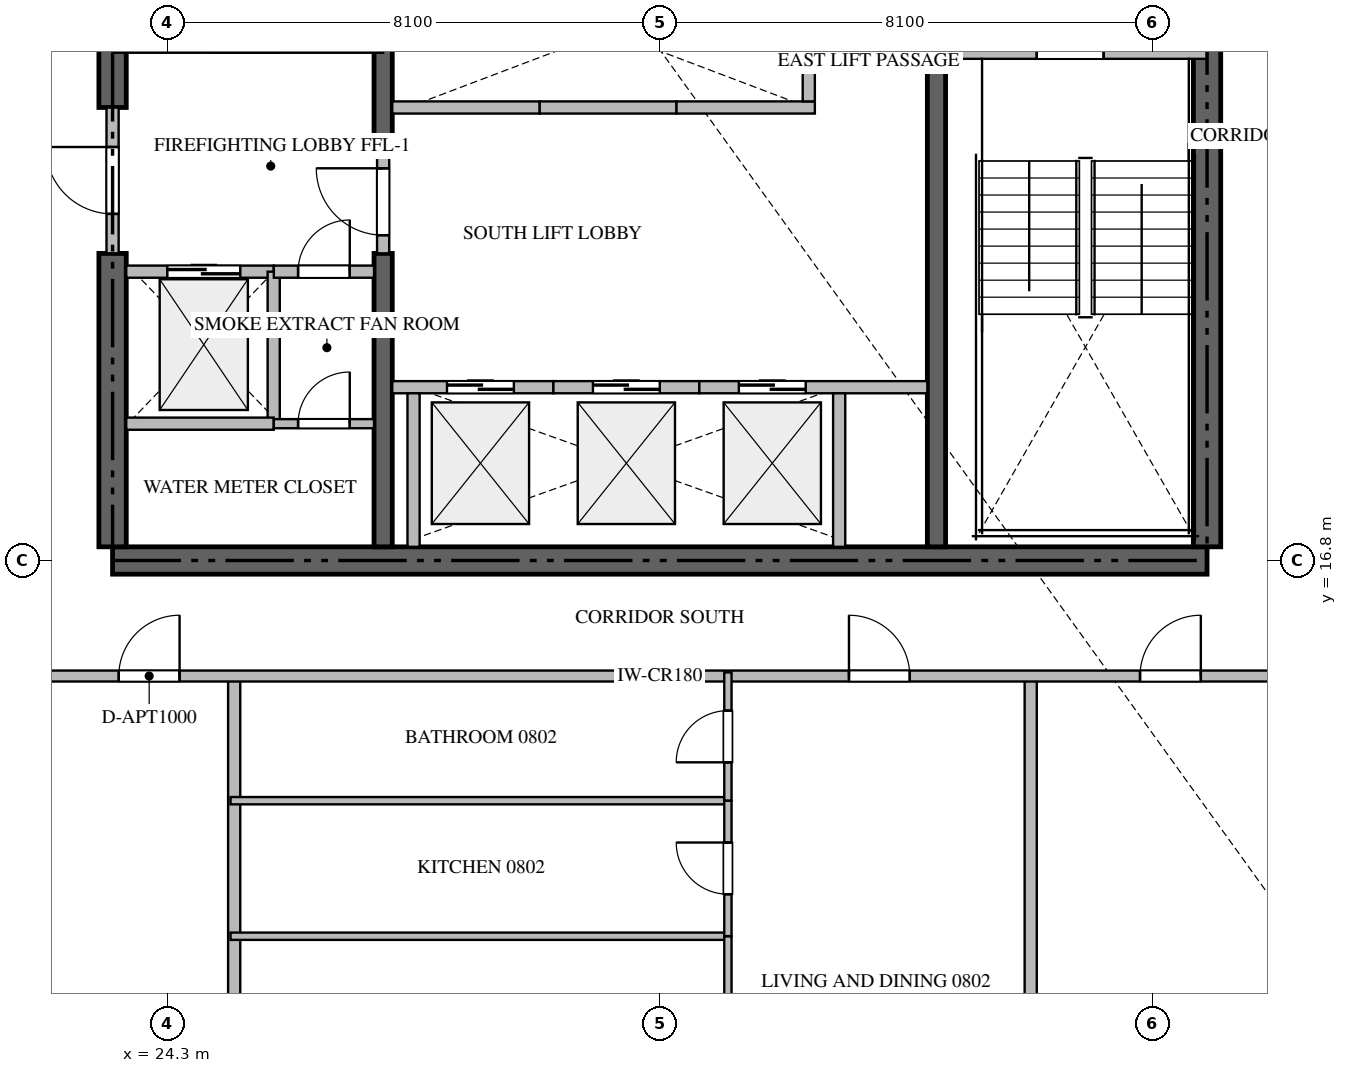
"""IFC4 building model, lengths in metres.
Left out: names, types, materials, properties, quantities, classifications, styles, units other than length and angle.
Written with IfcOpenShell. Run it as: python <this file> out.ifc"""

import sys

from ifc_helpers import new_model, si_unit, direction, frame, frame_2d, origin, place, context, subcontext, project, spatial, rectangle, extrude, source, transform, mapped, element, fill, save


model = new_model("IFC4")
c1 = context("Model", 3, precision=1e-05, world=origin(), true_north=direction((0.0, 1.0)))
c2 = subcontext(c1, "Body", "Model", "MODEL_VIEW")
j1 = project(units=[si_unit("LENGTHUNIT", "METRE"), si_unit("PLANEANGLEUNIT", "RADIAN")], contexts=[c1])
p1 = place(None, origin())
s1 = spatial("IfcSite", under=j1, at=p1, CompositionType="ELEMENT")
p2 = place(p1, origin())
s2 = spatial("IfcBuilding", under=s1, at=p2, CompositionType="ELEMENT")
p3 = place(p2, frame((0.0, 0.0, 37.95)))
s3 = spatial("IfcBuildingStorey", under=s2, at=p3, CompositionType="ELEMENT", Elevation=37.95)
p4 = place(p3, frame((23.4, 16.8, -0.26), z_axis=(0.0, 0.0, 1.0), x_axis=(1.0, 0.0, 0.0)))
e1 = element("IfcWall", 1, at=p4, inside=s3, PredefinedType="SHEAR", context=c2, shape_type="SweptSolid", body=[
    extrude(rectangle(XDim=18.0, YDim=0.45, at=frame_2d((9.0, 0.0))), origin(), (0.0, 0.0, 1.0), 3.748),
])
p5 = place(p3, frame((23.4, 17.025, -0.26), z_axis=(0.0, 0.0, 1.0), x_axis=(0.0, 1.0, 0.0)))
e2 = element("IfcWall", 2, at=p5, inside=s3, PredefinedType="SHEAR", context=c2, shape_type="SweptSolid", body=[
    extrude(rectangle(XDim=4.825, YDim=0.45, at=frame_2d((2.413, 0.0))), origin(), (0.0, 0.0, 1.0), 3.748),
])
p6 = place(p3, frame((23.4, 24.25, -0.26), z_axis=(0.0, 0.0, 1.0), x_axis=(0.0, 1.0, 0.0)))
e3 = element("IfcWall", 3, at=p6, inside=s3, PredefinedType="SHEAR", context=c2, shape_type="SweptSolid", body=[
    extrude(rectangle(XDim=9.125, YDim=0.45, at=frame_2d((4.562, 0.0))), origin(), (0.0, 0.0, 1.0), 3.748),
])
p7 = place(p3, frame((41.4, 17.025, -0.26), z_axis=(0.0, 0.0, 1.0), x_axis=(0.0, 1.0, 0.0)))
e4 = element("IfcWall", 4, at=p7, inside=s3, PredefinedType="SHEAR", context=c2, shape_type="SweptSolid", body=[
    extrude(rectangle(XDim=8.325, YDim=0.45, at=frame_2d((4.163, 0.0))), origin(), (0.0, 0.0, 1.0), 3.748),
])
p8 = place(p3, frame((27.85, 17.025, -0.26), z_axis=(0.0, 0.0, 1.0), x_axis=(0.0, 1.0, 0.0)))
e5 = element("IfcWall", 5, at=p8, inside=s3, PredefinedType="SHEAR", context=c2, shape_type="SweptSolid", body=[
    extrude(rectangle(XDim=4.825, YDim=0.3, at=frame_2d((2.413, 0.0))), origin(), (0.0, 0.0, 1.0), 3.748),
])
p9 = place(p3, frame((27.85, 23.55, -0.26), z_axis=(0.0, 0.0, 1.0), x_axis=(0.0, 1.0, 0.0)))
e6 = element("IfcWall", 6, at=p9, inside=s3, PredefinedType="SHEAR", context=c2, shape_type="SweptSolid", body=[
    extrude(rectangle(XDim=9.825, YDim=0.3, at=frame_2d((4.913, 0.0))), origin(), (0.0, 0.0, 1.0), 3.748),
])
p10 = place(p3, frame((36.95, 17.025, -0.26), z_axis=(0.0, 0.0, 1.0), x_axis=(0.0, 1.0, 0.0)))
e7 = element("IfcWall", 7, at=p10, inside=s3, PredefinedType="SHEAR", context=c2, shape_type="SweptSolid", body=[
    extrude(rectangle(XDim=8.325, YDim=0.3, at=frame_2d((4.163, 0.0))), origin(), (0.0, 0.0, 1.0), 3.748),
])
p11 = place(p3, frame((36.95, 25.15, 0.0), z_axis=(0.0, 0.0, 1.0), x_axis=(1.0, 0.0, 0.0)))
e8 = element("IfcWall", 8, at=p11, inside=s3, PredefinedType="STANDARD", context=c2, shape_type="SweptSolid", body=[
    extrude(rectangle(XDim=4.45, YDim=0.2, at=frame_2d((2.225, 0.0))), origin(), (0.0, 0.0, 1.0), 3.49),
])
p12 = place(p11, frame((1.65, 0.0, 0.0)))
e9 = element("IfcOpeningElement", 9, at=p12, cuts=e8, PredefinedType="OPENING", context=c2, shape_type="SweptSolid", body=[
    extrude(rectangle(XDim=1.1, YDim=2.15, at=frame_2d((0.55, 1.075))), frame((0.0, 0.11, 0.0), z_axis=(0.0, -1.0, 0.0), x_axis=(1.0, 0.0, 0.0)), (0.0, 0.0, 1.0), 0.22),
])
p13 = place(p3, frame((23.625, 21.55, 0.0), z_axis=(0.0, 0.0, 1.0), x_axis=(1.0, 0.0, 0.0)))
e10 = element("IfcWall", 10, at=p13, inside=s3, PredefinedType="STANDARD", context=c2, shape_type="SweptSolid", body=[
    extrude(rectangle(XDim=2.425, YDim=0.2, at=frame_2d((1.212, 0.0))), origin(), (0.0, 0.0, 1.0), 3.49),
])
p14 = place(p13, frame((0.675, 0.0, 0.0)))
e11 = element("IfcOpeningElement", 11, at=p14, cuts=e10, PredefinedType="OPENING", context=c2, shape_type="SweptSolid", body=[
    extrude(rectangle(XDim=1.2, YDim=2.2, at=frame_2d((0.6, 1.1))), frame((0.0, 0.11, 0.0), z_axis=(0.0, -1.0, 0.0), x_axis=(1.0, 0.0, 0.0)), (0.0, 0.0, 1.0), 0.22),
])
p15 = place(p3, frame((28.0, 19.65, 0.0), z_axis=(0.0, 0.0, 1.0), x_axis=(1.0, 0.0, 0.0)))
e12 = element("IfcWall", 12, at=p15, inside=s3, PredefinedType="STANDARD", context=c2, shape_type="SweptSolid", body=[
    extrude(rectangle(XDim=2.65, YDim=0.2, at=frame_2d((1.325, 0.0))), origin(), (0.0, 0.0, 1.0), 3.49),
])
p16 = place(p15, frame((0.9, 0.0, 0.0)))
e13 = element("IfcOpeningElement", 13, at=p16, cuts=e12, PredefinedType="OPENING", context=c2, shape_type="SweptSolid", body=[
    extrude(rectangle(XDim=1.1, YDim=2.2, at=frame_2d((0.55, 1.1))), frame((0.0, 0.11, 0.0), z_axis=(0.0, -1.0, 0.0), x_axis=(1.0, 0.0, 0.0)), (0.0, 0.0, 1.0), 0.22),
])
p17 = place(p3, frame((28.35, 17.025, 0.0), z_axis=(0.0, 0.0, 1.0), x_axis=(0.0, 1.0, 0.0)))
e14 = element("IfcWall", 14, at=p17, inside=s3, PredefinedType="STANDARD", context=c2, shape_type="SweptSolid", body=[
    extrude(rectangle(XDim=2.525, YDim=0.2, at=frame_2d((1.263, 0.0))), origin(), (0.0, 0.0, 1.0), 3.49),
])
p18 = place(p3, frame((30.65, 19.65, 0.0), z_axis=(0.0, 0.0, 1.0), x_axis=(1.0, 0.0, 0.0)))
e15 = element("IfcWall", 15, at=p18, inside=s3, PredefinedType="STANDARD", context=c2, shape_type="SweptSolid", body=[
    extrude(rectangle(XDim=2.4, YDim=0.2, at=frame_2d((1.2, 0.0))), origin(), (0.0, 0.0, 1.0), 3.49),
])
p19 = place(p18, frame((0.65, 0.0, 0.0)))
e16 = element("IfcOpeningElement", 16, at=p19, cuts=e15, PredefinedType="OPENING", context=c2, shape_type="SweptSolid", body=[
    extrude(rectangle(XDim=1.1, YDim=2.2, at=frame_2d((0.55, 1.1))), frame((0.0, 0.11, 0.0), z_axis=(0.0, -1.0, 0.0), x_axis=(1.0, 0.0, 0.0)), (0.0, 0.0, 1.0), 0.22),
])
p20 = place(p3, frame((33.05, 19.65, 0.0), z_axis=(0.0, 0.0, 1.0), x_axis=(1.0, 0.0, 0.0)))
e17 = element("IfcWall", 17, at=p20, inside=s3, PredefinedType="STANDARD", context=c2, shape_type="SweptSolid", body=[
    extrude(rectangle(XDim=3.75, YDim=0.2, at=frame_2d((1.875, 0.0))), origin(), (0.0, 0.0, 1.0), 3.49),
])
p21 = place(p20, frame((0.65, 0.0, 0.0)))
e18 = element("IfcOpeningElement", 18, at=p21, cuts=e17, PredefinedType="OPENING", context=c2, shape_type="SweptSolid", body=[
    extrude(rectangle(XDim=1.1, YDim=2.2, at=frame_2d((0.55, 1.1))), frame((0.0, 0.11, 0.0), z_axis=(0.0, -1.0, 0.0), x_axis=(1.0, 0.0, 0.0)), (0.0, 0.0, 1.0), 0.22),
])
p22 = place(p3, frame((35.35, 17.025, 0.0), z_axis=(0.0, 0.0, 1.0), x_axis=(0.0, 1.0, 0.0)))
e19 = element("IfcWall", 19, at=p22, inside=s3, PredefinedType="STANDARD", context=c2, shape_type="SweptSolid", body=[
    extrude(rectangle(XDim=2.525, YDim=0.2, at=frame_2d((1.263, 0.0))), origin(), (0.0, 0.0, 1.0), 3.49),
])
p23 = place(p3, frame((28.0, 24.25, 0.0), z_axis=(0.0, 0.0, 1.0), x_axis=(1.0, 0.0, 0.0)))
e20 = element("IfcWall", 20, at=p23, inside=s3, PredefinedType="STANDARD", context=c2, shape_type="SweptSolid", body=[
    extrude(rectangle(XDim=2.425, YDim=0.2, at=frame_2d((1.212, 0.0))), origin(), (0.0, 0.0, 1.0), 3.49),
])
p24 = place(p3, frame((30.425, 24.25, 0.0), z_axis=(0.0, 0.0, 1.0), x_axis=(1.0, 0.0, 0.0)))
e21 = element("IfcWall", 21, at=p24, inside=s3, PredefinedType="STANDARD", context=c2, shape_type="SweptSolid", body=[
    extrude(rectangle(XDim=2.25, YDim=0.2, at=frame_2d((1.125, 0.0))), origin(), (0.0, 0.0, 1.0), 3.49),
])
p25 = place(p3, frame((32.675, 24.25, 0.0), z_axis=(0.0, 0.0, 1.0), x_axis=(1.0, 0.0, 0.0)))
e22 = element("IfcWall", 22, at=p25, inside=s3, PredefinedType="STANDARD", context=c2, shape_type="SweptSolid", body=[
    extrude(rectangle(XDim=2.275, YDim=0.2, at=frame_2d((1.137, 0.0))), origin(), (0.0, 0.0, 1.0), 3.49),
])
for number, where, z_axis, x_axis in (
    (23, (34.85, 24.35, 0.0), (0.0, 0.0, 1.0), (0.0, 1.0, 0.0)),
    (24, (26.05, 19.05, 0.0), (0.0, 0.0, 1.0), (0.0, 1.0, 0.0)),
):
    element("IfcWall", number, at=place(p3, frame(where, z_axis=z_axis, x_axis=x_axis)), inside=s3, PredefinedType="STANDARD", context=c2, shape_type="SweptSolid", body=[
        extrude(rectangle(XDim=2.5, YDim=0.2, at=frame_2d((1.25, 0.0))), origin(), (0.0, 0.0, 1.0), 3.49),
    ])
p26 = place(p3, frame((23.625, 19.05, 0.0), z_axis=(0.0, 0.0, 1.0), x_axis=(1.0, 0.0, 0.0)))
e25 = element("IfcWall", 25, at=p26, inside=s3, PredefinedType="STANDARD", context=c2, shape_type="SweptSolid", body=[
    extrude(rectangle(XDim=2.425, YDim=0.2, at=frame_2d((1.212, 0.0))), origin(), (0.0, 0.0, 1.0), 3.49),
])
p27 = place(p3, frame((26.052, 21.55, 0.0), z_axis=(0.0, 0.0, 1.0), x_axis=(1.0, 0.0, 0.0)))
e26 = element("IfcWall", 26, at=p27, inside=s3, PredefinedType="STANDARD", context=c2, shape_type="SweptSolid", body=[
    extrude(rectangle(XDim=1.648, YDim=0.2, at=frame_2d((0.824, 0.0))), origin(), (0.0, 0.0, 1.0), 3.49),
])
p28 = place(p27, frame((0.399, 0.0, 0.0)))
e27 = element("IfcOpeningElement", 27, at=p28, cuts=e26, PredefinedType="OPENING", context=c2, shape_type="SweptSolid", body=[
    extrude(rectangle(XDim=0.85, YDim=2.1, at=frame_2d((0.425, 1.05))), frame((0.0, 0.11, 0.0), z_axis=(0.0, -1.0, 0.0), x_axis=(1.0, 0.0, 0.0)), (0.0, 0.0, 1.0), 0.22),
])
p29 = place(p3, frame((23.4, 21.852, 0.0), z_axis=(0.0, 0.0, 1.0), x_axis=(0.0, 1.0, 0.0)))
e28 = element("IfcWall", 28, at=p29, inside=s3, PredefinedType="STANDARD", context=c2, shape_type="SweptSolid", body=[
    extrude(rectangle(XDim=2.396, YDim=0.2, at=frame_2d((1.198, 0.0))), origin(), (0.0, 0.0, 1.0), 3.49),
])
p30 = place(p29, frame((0.648, 0.0, 0.0)))
e29 = element("IfcOpeningElement", 29, at=p30, cuts=e28, PredefinedType="OPENING", context=c2, shape_type="SweptSolid", body=[
    extrude(rectangle(XDim=1.1, YDim=2.15, at=frame_2d((0.55, 1.075))), frame((0.0, 0.11, 0.0), z_axis=(0.0, -1.0, 0.0), x_axis=(1.0, 0.0, 0.0)), (0.0, 0.0, 1.0), 0.22),
])
p31 = place(p3, frame((27.85, 21.852, 0.0), z_axis=(0.0, 0.0, 1.0), x_axis=(0.0, 1.0, 0.0)))
e30 = element("IfcWall", 30, at=p31, inside=s3, PredefinedType="STANDARD", context=c2, shape_type="SweptSolid", body=[
    extrude(rectangle(XDim=1.696, YDim=0.2, at=frame_2d((0.848, 0.0))), origin(), (0.0, 0.0, 1.0), 3.49),
])
p32 = place(p31, frame((0.298, 0.0, 0.0)))
e31 = element("IfcOpeningElement", 31, at=p32, cuts=e30, PredefinedType="OPENING", context=c2, shape_type="SweptSolid", body=[
    extrude(rectangle(XDim=1.1, YDim=2.15, at=frame_2d((0.55, 1.075))), frame((0.0, 0.11, 0.0), z_axis=(0.0, -1.0, 0.0), x_axis=(1.0, 0.0, 0.0)), (0.0, 0.0, 1.0), 0.22),
])
p33 = place(p3, frame((26.052, 19.05, 0.0), z_axis=(0.0, 0.0, 1.0), x_axis=(1.0, 0.0, 0.0)))
e32 = element("IfcWall", 32, at=p33, inside=s3, PredefinedType="PARTITIONING", context=c2, shape_type="SweptSolid", body=[
    extrude(rectangle(XDim=1.648, YDim=0.15, at=frame_2d((0.824, 0.0))), origin(), (0.0, 0.0, 1.0), 3.49),
])
p34 = place(p33, frame((0.399, 0.0, 0.0)))
e33 = element("IfcOpeningElement", 33, at=p34, cuts=e32, PredefinedType="OPENING", context=c2, shape_type="SweptSolid", body=[
    extrude(rectangle(XDim=0.85, YDim=2.1, at=frame_2d((0.425, 1.05))), frame((0.0, 0.085, 0.0), z_axis=(0.0, -1.0, 0.0), x_axis=(1.0, 0.0, 0.0)), (0.0, 0.0, 1.0), 0.17),
])
for number, where, z_axis, x_axis in (
    (34, (25.4, 0.282, 0.0), (0.0, 0.0, 1.0), (0.0, 1.0, 0.0)),
    (35, (38.5, 0.282, 0.0), (0.0, 0.0, 1.0), (0.0, 1.0, 0.0)),
):
    element("IfcWall", number, at=place(p3, frame(where, z_axis=z_axis, x_axis=x_axis)), inside=s3, PredefinedType="PARTITIONING", context=c2, shape_type="SweptSolid", body=[
        extrude(rectangle(XDim=14.618, YDim=0.2, at=frame_2d((7.309, 0.0))), origin(), (0.0, 0.0, 1.0), 3.49),
    ])
p35 = place(p3, frame((21.402, 14.9, 0.0), z_axis=(0.0, 0.0, 1.0), x_axis=(1.0, 0.0, 0.0)))
e36 = element("IfcWall", 36, at=p35, inside=s3, PredefinedType="PARTITIONING", context=c2, shape_type="SweptSolid", body=[
    extrude(rectangle(XDim=21.996, YDim=0.18, at=frame_2d((10.998, 0.0))), origin(), (0.0, 0.0, 1.0), 3.49),
])
p36 = place(p35, frame((2.1, 0.0, 0.0)))
e37 = element("IfcOpeningElement", 37, at=p36, cuts=e36, PredefinedType="OPENING", context=c2, shape_type="SweptSolid", body=[
    extrude(rectangle(XDim=1.0, YDim=2.15, at=frame_2d((0.5, 1.075))), frame((0.0, 0.1, 0.0), z_axis=(0.0, -1.0, 0.0), x_axis=(1.0, 0.0, 0.0)), (0.0, 0.0, 1.0), 0.2),
])
p37 = place(p35, frame((14.109, 0.0, 0.0)))
e38 = element("IfcOpeningElement", 38, at=p37, cuts=e36, PredefinedType="OPENING", context=c2, shape_type="SweptSolid", body=[
    extrude(rectangle(XDim=1.0, YDim=2.15, at=frame_2d((0.5, 1.075))), frame((0.0, 0.1, 0.0), z_axis=(0.0, -1.0, 0.0), x_axis=(1.0, 0.0, 0.0)), (0.0, 0.0, 1.0), 0.2),
])
p38 = place(p35, frame((18.896, 0.0, 0.0)))
e39 = element("IfcOpeningElement", 39, at=p38, cuts=e36, PredefinedType="OPENING", context=c2, shape_type="SweptSolid", body=[
    extrude(rectangle(XDim=1.0, YDim=2.15, at=frame_2d((0.5, 1.075))), frame((0.0, 0.1, 0.0), z_axis=(0.0, -1.0, 0.0), x_axis=(1.0, 0.0, 0.0)), (0.0, 0.0, 1.0), 0.2),
])
for number, where, z_axis, x_axis in (
    (40, (25.34, 10.621, 0.0), (0.0, 0.0, 1.0), (1.0, 0.0, 0.0)),
    (41, (25.34, 12.85, 0.0), (0.0, 0.0, 1.0), (1.0, 0.0, 0.0)),
):
    element("IfcWall", number, at=place(p3, frame(where, z_axis=z_axis, x_axis=x_axis)), inside=s3, PredefinedType="PARTITIONING", context=c2, shape_type="SweptSolid", body=[
        extrude(rectangle(XDim=8.18, YDim=0.12, at=frame_2d((4.09, 0.0))), origin(), (0.0, 0.0, 1.0), 3.49),
    ])
p39 = place(p3, frame((33.52, 5.53, 0.0), z_axis=(0.0, 0.0, 1.0), x_axis=(0.0, 1.0, 0.0)))
e42 = element("IfcWall", 42, at=p39, inside=s3, PredefinedType="PARTITIONING", context=c2, shape_type="SweptSolid", body=[
    extrude(rectangle(XDim=5.091, YDim=0.12, at=frame_2d((2.545, 0.0))), origin(), (0.0, 0.0, 1.0), 3.49),
])
p40 = place(p39, frame((2.121, 0.0, 0.0)))
e43 = element("IfcOpeningElement", 43, at=p40, cuts=e42, PredefinedType="OPENING", context=c2, shape_type="SweptSolid", body=[
    extrude(rectangle(XDim=0.85, YDim=2.1, at=frame_2d((0.425, 1.05))), frame((0.0, 0.07, 0.0), z_axis=(0.0, -1.0, 0.0), x_axis=(1.0, 0.0, 0.0)), (0.0, 0.0, 1.0), 0.14),
])
p41 = place(p3, frame((33.52, 10.623, 0.0), z_axis=(0.0, 0.0, 1.0), x_axis=(0.0, 1.0, 0.0)))
e44 = element("IfcWall", 44, at=p41, inside=s3, PredefinedType="PARTITIONING", context=c2, shape_type="SweptSolid", body=[
    extrude(rectangle(XDim=2.227, YDim=0.12, at=frame_2d((1.114, 0.0))), origin(), (0.0, 0.0, 1.0), 3.49),
])
p42 = place(p41, frame((0.689, 0.0, 0.0)))
e45 = element("IfcOpeningElement", 45, at=p42, cuts=e44, PredefinedType="OPENING", context=c2, shape_type="SweptSolid", body=[
    extrude(rectangle(XDim=0.85, YDim=2.1, at=frame_2d((0.425, 1.05))), frame((0.0, 0.07, 0.0), z_axis=(0.0, -1.0, 0.0), x_axis=(1.0, 0.0, 0.0)), (0.0, 0.0, 1.0), 0.14),
])
p43 = place(p3, frame((33.52, 12.852, 0.0), z_axis=(0.0, 0.0, 1.0), x_axis=(0.0, 1.0, 0.0)))
e46 = element("IfcWall", 46, at=p43, inside=s3, PredefinedType="PARTITIONING", context=c2, shape_type="SweptSolid", body=[
    extrude(rectangle(XDim=2.108, YDim=0.12, at=frame_2d((1.054, 0.0))), origin(), (0.0, 0.0, 1.0), 3.49),
])
p44 = place(p43, frame((0.629, 0.0, 0.0)))
e47 = element("IfcOpeningElement", 47, at=p44, cuts=e46, PredefinedType="OPENING", context=c2, shape_type="SweptSolid", body=[
    extrude(rectangle(XDim=0.85, YDim=2.1, at=frame_2d((0.425, 1.05))), frame((0.0, 0.07, 0.0), z_axis=(0.0, -1.0, 0.0), x_axis=(1.0, 0.0, 0.0)), (0.0, 0.0, 1.0), 0.14),
])
m1 = source(origin(), c2, "Body", "SweptSolid", [
    extrude(rectangle(XDim=1.1, YDim=2.15, at=frame_2d((0.55, 1.075))), frame((0.0, 0.025, 0.0), z_axis=(0.0, -1.0, 0.0), x_axis=(1.0, 0.0, 0.0)), (0.0, 0.0, 1.0), 0.05),
])
p45 = place(p12, origin())
e48 = element("IfcDoor", 48, at=p45, inside=s3, OperationType="SINGLE_SWING_LEFT", PredefinedType="DOOR", context=c2, shape_type="MappedRepresentation", body=[
    mapped(m1, transform((0.0, 0.0, 0.0), scale=1.0)),
])
fill(e9, e48)
m2 = source(origin(), c2, "Body", "SweptSolid", [
    extrude(rectangle(XDim=1.2, YDim=2.2, at=frame_2d((0.6, 1.1))), frame((0.0, 0.025, 0.0), z_axis=(0.0, -1.0, 0.0), x_axis=(1.0, 0.0, 0.0)), (0.0, 0.0, 1.0), 0.05),
])
p46 = place(p14, origin())
e49 = element("IfcDoor", 49, at=p46, inside=s3, OperationType="DOUBLE_DOOR_SLIDING", PredefinedType="DOOR", context=c2, shape_type="MappedRepresentation", body=[
    mapped(m2, transform((0.0, 0.0, 0.0), scale=1.0)),
])
fill(e11, e49)
m3 = source(origin(), c2, "Body", "SweptSolid", [
    extrude(rectangle(XDim=1.1, YDim=2.2, at=frame_2d((0.55, 1.1))), frame((0.0, 0.025, 0.0), z_axis=(0.0, -1.0, 0.0), x_axis=(1.0, 0.0, 0.0)), (0.0, 0.0, 1.0), 0.05),
])
p47 = place(p16, origin())
e50 = element("IfcDoor", 50, at=p47, inside=s3, OperationType="DOUBLE_DOOR_SLIDING", PredefinedType="DOOR", context=c2, shape_type="MappedRepresentation", body=[
    mapped(m3, transform((0.0, 0.0, 0.0), scale=1.0)),
])
fill(e13, e50)
p48 = place(p19, origin())
e51 = element("IfcDoor", 51, at=p48, inside=s3, OperationType="DOUBLE_DOOR_SLIDING", PredefinedType="DOOR", context=c2, shape_type="MappedRepresentation", body=[
    mapped(m3, transform((0.0, 0.0, 0.0), scale=1.0)),
])
fill(e16, e51)
p49 = place(p21, origin())
e52 = element("IfcDoor", 52, at=p49, inside=s3, OperationType="DOUBLE_DOOR_SLIDING", PredefinedType="DOOR", context=c2, shape_type="MappedRepresentation", body=[
    mapped(m3, transform((0.0, 0.0, 0.0), scale=1.0)),
])
fill(e18, e52)
m4 = source(origin(), c2, "Body", "SweptSolid", [
    extrude(rectangle(XDim=0.85, YDim=2.1, at=frame_2d((0.425, 1.05))), frame((0.0, 0.025, 0.0), z_axis=(0.0, -1.0, 0.0), x_axis=(1.0, 0.0, 0.0)), (0.0, 0.0, 1.0), 0.05),
])
p50 = place(p28, origin())
e53 = element("IfcDoor", 53, at=p50, inside=s3, OperationType="SINGLE_SWING_RIGHT", PredefinedType="DOOR", context=c2, shape_type="MappedRepresentation", body=[
    mapped(m4, transform((0.0, 0.0, 0.0), scale=1.0)),
])
fill(e27, e53)
p51 = place(p30, origin())
e54 = element("IfcDoor", 54, at=p51, inside=s3, OperationType="SINGLE_SWING_RIGHT", PredefinedType="DOOR", context=c2, shape_type="MappedRepresentation", body=[
    mapped(m1, transform((0.0, 0.0, 0.0), scale=1.0)),
])
fill(e29, e54)
p52 = place(p32, origin())
e55 = element("IfcDoor", 55, at=p52, inside=s3, OperationType="SINGLE_SWING_RIGHT", PredefinedType="DOOR", context=c2, shape_type="MappedRepresentation", body=[
    mapped(m1, transform((0.0, 0.0, 0.0), scale=1.0)),
])
fill(e31, e55)
p53 = place(p34, origin())
e56 = element("IfcDoor", 56, at=p53, inside=s3, OperationType="SINGLE_SWING_RIGHT", PredefinedType="DOOR", context=c2, shape_type="MappedRepresentation", body=[
    mapped(m4, transform((0.0, 0.0, 0.0), scale=1.0)),
])
fill(e33, e56)
m5 = source(origin(), c2, "Body", "SweptSolid", [
    extrude(rectangle(XDim=1.0, YDim=2.15, at=frame_2d((0.5, 1.075))), frame((0.0, 0.025, 0.0), z_axis=(0.0, -1.0, 0.0), x_axis=(1.0, 0.0, 0.0)), (0.0, 0.0, 1.0), 0.05),
])
p54 = place(p36, origin())
e57 = element("IfcDoor", 57, at=p54, inside=s3, OperationType="SINGLE_SWING_RIGHT", PredefinedType="DOOR", context=c2, shape_type="MappedRepresentation", body=[
    mapped(m5, transform((0.0, 0.0, 0.0), scale=1.0)),
])
fill(e37, e57)
p55 = place(p37, origin())
e58 = element("IfcDoor", 58, at=p55, inside=s3, OperationType="SINGLE_SWING_LEFT", PredefinedType="DOOR", context=c2, shape_type="MappedRepresentation", body=[
    mapped(m5, transform((0.0, 0.0, 0.0), scale=1.0)),
])
fill(e38, e58)
p56 = place(p38, origin())
e59 = element("IfcDoor", 59, at=p56, inside=s3, OperationType="SINGLE_SWING_RIGHT", PredefinedType="DOOR", context=c2, shape_type="MappedRepresentation", body=[
    mapped(m5, transform((0.0, 0.0, 0.0), scale=1.0)),
])
fill(e39, e59)
p57 = place(p42, origin())
e60 = element("IfcDoor", 60, at=p57, inside=s3, OperationType="SINGLE_SWING_RIGHT", PredefinedType="DOOR", context=c2, shape_type="MappedRepresentation", body=[
    mapped(m4, transform((0.0, 0.0, 0.0), scale=1.0)),
])
fill(e45, e60)
p58 = place(p44, origin())
e61 = element("IfcDoor", 61, at=p58, inside=s3, OperationType="SINGLE_SWING_LEFT", PredefinedType="DOOR", context=c2, shape_type="MappedRepresentation", body=[
    mapped(m4, transform((0.0, 0.0, 0.0), scale=1.0)),
])
fill(e47, e61)
save(model, sys.argv[1])
